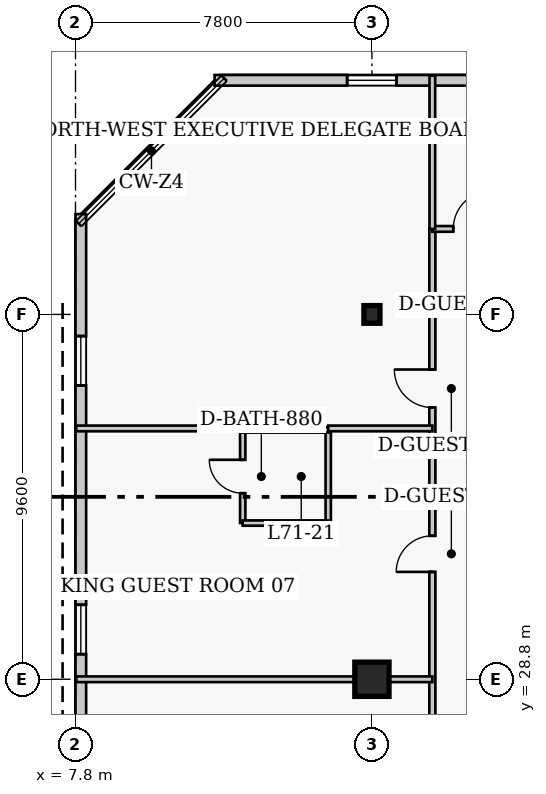
"""IFC4 building model, lengths in metres.
Left out: names, types, materials, properties, quantities, classifications, styles, units other than length and angle.
Written with IfcOpenShell. Run it as: python <this file> out.ifc"""

import sys

from ifc_helpers import new_model, si_unit, direction, frame, frame_2d, origin, origin_2d, place, context, subcontext, project, spatial, rectangle, i_section, extrude, element, fill, save


model = new_model("IFC4")
c1 = context("Model", 3, precision=1e-05, world=origin(), true_north=direction((0.0, 1.0)))
c2 = subcontext(c1, "Body", "Model", "MODEL_VIEW")
j1 = project(units=[si_unit("LENGTHUNIT", "METRE"), si_unit("PLANEANGLEUNIT", "RADIAN")], contexts=[c1])
p1 = place(None, origin())
s1 = spatial("IfcSite", under=j1, at=p1, CompositionType="ELEMENT")
p2 = place(p1, origin())
s2 = spatial("IfcBuilding", under=s1, at=p2, CompositionType="ELEMENT")
p3 = place(p2, frame((0.0, 0.0, 285.4)))
s3 = spatial("IfcBuildingStorey", under=s2, at=p3, CompositionType="ELEMENT", Elevation=285.4)
p4 = place(p3, frame((15.6, 28.8, 0.0), z_axis=(0.0, 0.0, 1.0), x_axis=(1.0, 0.0, 0.0)))
e1 = element("IfcColumn", 1, at=p4, inside=s3, PredefinedType="COLUMN", context=c2, shape_type="SweptSolid", body=[
    extrude(rectangle(XDim=0.9, YDim=0.9, at=origin_2d()), origin(), (0.0, 0.0, 1.0), 4.0),
])
p5 = place(p3, frame((15.6, 38.4, 0.0), z_axis=(0.0, 0.0, 1.0), x_axis=(1.0, 0.0, 0.0)))
e2 = element("IfcColumn", 2, at=p5, inside=s3, PredefinedType="COLUMN", context=c2, shape_type="SweptSolid", body=[
    extrude(i_section(OverallWidth=0.422, OverallDepth=0.465, WebThickness=0.045, FlangeThickness=0.073, FilletRadius=0.017, at=origin_2d()), origin(), (0.0, 0.0, 1.0), 4.0),
])
p6 = place(p3, frame((36.29, 44.56, 0.0), z_axis=(0.0, 0.0, 1.0), x_axis=(-1.0, 0.0, 0.0)))
e3 = element("IfcWall", 3, at=p6, inside=s3, PredefinedType="SOLIDWALL", context=c2, shape_type="SweptSolid", body=[
    extrude(rectangle(XDim=24.83, YDim=0.28, at=frame_2d((12.415, 0.0))), origin(), (0.0, 0.0, 1.0), 3.76),
])
p7 = place(p6, frame((3.488, 0.0, 0.85)))
e4 = element("IfcOpeningElement", 4, at=p7, cuts=e3, PredefinedType="OPENING", context=c2, shape_type="SweptSolid", body=[
    extrude(rectangle(XDim=1.3, YDim=1.7, at=frame_2d((0.65, 0.85))), frame((0.0, 0.15, 0.0), z_axis=(0.0, -1.0, 0.0), x_axis=(1.0, 0.0, 0.0)), (0.0, 0.0, 1.0), 0.3),
])
p8 = place(p6, frame((11.765, 0.0, 0.85)))
e5 = element("IfcOpeningElement", 5, at=p8, cuts=e3, PredefinedType="OPENING", context=c2, shape_type="SweptSolid", body=[
    extrude(rectangle(XDim=1.3, YDim=1.7, at=frame_2d((0.65, 0.85))), frame((0.0, 0.15, 0.0), z_axis=(0.0, -1.0, 0.0), x_axis=(1.0, 0.0, 0.0)), (0.0, 0.0, 1.0), 0.3),
])
p9 = place(p6, frame((20.042, 0.0, 0.85)))
e6 = element("IfcOpeningElement", 6, at=p9, cuts=e3, PredefinedType="OPENING", context=c2, shape_type="SweptSolid", body=[
    extrude(rectangle(XDim=1.3, YDim=1.7, at=frame_2d((0.65, 0.85))), frame((0.0, 0.15, 0.0), z_axis=(0.0, -1.0, 0.0), x_axis=(1.0, 0.0, 0.0)), (0.0, 0.0, 1.0), 0.3),
])
p10 = place(p3, frame((7.94, 41.04, 0.0), z_axis=(0.0, 0.0, 1.0), x_axis=(0.0, -1.0, 0.0)))
e7 = element("IfcWall", 7, at=p10, inside=s3, PredefinedType="SOLIDWALL", context=c2, shape_type="SweptSolid", body=[
    extrude(rectangle(XDim=30.88, YDim=0.28, at=frame_2d((15.44, 0.0))), origin(), (0.0, 0.0, 1.0), 3.76),
])
p11 = place(p10, frame((3.21, 0.0, 0.85)))
e8 = element("IfcOpeningElement", 8, at=p11, cuts=e7, PredefinedType="OPENING", context=c2, shape_type="SweptSolid", body=[
    extrude(rectangle(XDim=1.3, YDim=1.7, at=frame_2d((0.65, 0.85))), frame((0.0, 0.15, 0.0), z_axis=(0.0, -1.0, 0.0), x_axis=(1.0, 0.0, 0.0)), (0.0, 0.0, 1.0), 0.3),
])
p12 = place(p10, frame((10.28, 0.0, 0.85)))
e9 = element("IfcOpeningElement", 9, at=p12, cuts=e7, PredefinedType="OPENING", context=c2, shape_type="SweptSolid", body=[
    extrude(rectangle(XDim=1.3, YDim=1.7, at=frame_2d((0.65, 0.85))), frame((0.0, 0.15, 0.0), z_axis=(0.0, -1.0, 0.0), x_axis=(1.0, 0.0, 0.0)), (0.0, 0.0, 1.0), 0.3),
])
p13 = place(p10, frame((18.65, 0.0, 0.85)))
e10 = element("IfcOpeningElement", 10, at=p13, cuts=e7, PredefinedType="OPENING", context=c2, shape_type="SweptSolid", body=[
    extrude(rectangle(XDim=1.3, YDim=1.7, at=frame_2d((0.65, 0.85))), frame((0.0, 0.15, 0.0), z_axis=(0.0, -1.0, 0.0), x_axis=(1.0, 0.0, 0.0)), (0.0, 0.0, 1.0), 0.3),
])
p14 = place(p10, frame((26.37, 0.0, 0.85)))
e11 = element("IfcOpeningElement", 11, at=p14, cuts=e7, PredefinedType="OPENING", context=c2, shape_type="SweptSolid", body=[
    extrude(rectangle(XDim=1.3, YDim=1.7, at=frame_2d((0.65, 0.85))), frame((0.0, 0.15, 0.0), z_axis=(0.0, -1.0, 0.0), x_axis=(1.0, 0.0, 0.0)), (0.0, 0.0, 1.0), 0.3),
])
p15 = place(p3, frame((17.19, 8.55, 0.0), z_axis=(0.0, 0.0, 1.0), x_axis=(0.0, 1.0, 0.0)))
e12 = element("IfcWall", 12, at=p15, inside=s3, PredefinedType="PARTITIONING", context=c2, shape_type="SweptSolid", body=[
    extrude(rectangle(XDim=32.1, YDim=0.16, at=frame_2d((16.05, 0.0))), origin(), (0.0, 0.0, 1.0), 3.76),
])
p16 = place(p15, frame((5.25, 0.0, 0.0)))
e13 = element("IfcOpeningElement", 13, at=p16, cuts=e12, PredefinedType="OPENING", context=c2, shape_type="SweptSolid", body=[
    extrude(rectangle(XDim=0.95, YDim=2.1, at=frame_2d((0.475, 1.05))), frame((0.0, 0.09, 0.0), z_axis=(0.0, -1.0, 0.0), x_axis=(1.0, 0.0, 0.0)), (0.0, 0.0, 1.0), 0.18),
])
p17 = place(p15, frame((15.375, 0.0, 0.0)))
e14 = element("IfcOpeningElement", 14, at=p17, cuts=e12, PredefinedType="OPENING", context=c2, shape_type="SweptSolid", body=[
    extrude(rectangle(XDim=0.95, YDim=2.1, at=frame_2d((0.475, 1.05))), frame((0.0, 0.09, 0.0), z_axis=(0.0, -1.0, 0.0), x_axis=(1.0, 0.0, 0.0)), (0.0, 0.0, 1.0), 0.18),
])
p18 = place(p15, frame((23.075, 0.0, 0.0)))
e15 = element("IfcOpeningElement", 15, at=p18, cuts=e12, PredefinedType="OPENING", context=c2, shape_type="SweptSolid", body=[
    extrude(rectangle(XDim=0.95, YDim=2.1, at=frame_2d((0.475, 1.05))), frame((0.0, 0.09, 0.0), z_axis=(0.0, -1.0, 0.0), x_axis=(1.0, 0.0, 0.0)), (0.0, 0.0, 1.0), 0.18),
])
p19 = place(p15, frame((27.4, 0.0, 0.0)))
e16 = element("IfcOpeningElement", 16, at=p19, cuts=e12, PredefinedType="OPENING", context=c2, shape_type="SweptSolid", body=[
    extrude(rectangle(XDim=1.0, YDim=2.15, at=frame_2d((0.5, 1.075))), frame((0.0, 0.09, 0.0), z_axis=(0.0, -1.0, 0.0), x_axis=(1.0, 0.0, 0.0)), (0.0, 0.0, 1.0), 0.18),
])
p20 = place(p3, frame((17.19, 40.65, 0.0), z_axis=(0.0, 0.0, 1.0), x_axis=(1.0, 0.0, 0.0)))
e17 = element("IfcWall", 17, at=p20, inside=s3, PredefinedType="PARTITIONING", context=c2, shape_type="SweptSolid", body=[
    extrude(rectangle(XDim=4.91, YDim=0.15, at=frame_2d((2.455, 0.0))), origin(), (0.0, 0.0, 1.0), 3.76),
])
p21 = place(p20, frame((0.55, 0.0, 0.0)))
e18 = element("IfcOpeningElement", 18, at=p21, cuts=e17, PredefinedType="OPENING", context=c2, shape_type="SweptSolid", body=[
    extrude(rectangle(XDim=1.0, YDim=2.15, at=frame_2d((0.5, 1.075))), frame((0.0, 0.085, 0.0), z_axis=(0.0, -1.0, 0.0), x_axis=(1.0, 0.0, 0.0)), (0.0, 0.0, 1.0), 0.17),
])
p22 = place(p3, frame((17.19, 40.65, 0.0), z_axis=(0.0, 0.0, 1.0), x_axis=(0.0, 1.0, 0.0)))
e19 = element("IfcWall", 19, at=p22, inside=s3, PredefinedType="PARTITIONING", context=c2, shape_type="SweptSolid", body=[
    extrude(rectangle(XDim=4.03, YDim=0.15, at=frame_2d((2.015, 0.0))), origin(), (0.0, 0.0, 1.0), 3.76),
])
p23 = place(p3, frame((7.82, 28.8, 0.0), z_axis=(0.0, 0.0, 1.0), x_axis=(1.0, 0.0, 0.0)))
e20 = element("IfcWall", 20, at=p23, inside=s3, PredefinedType="PARTITIONING", context=c2, shape_type="SweptSolid", body=[
    extrude(rectangle(XDim=9.37, YDim=0.15, at=frame_2d((4.685, 0.0))), origin(), (0.0, 0.0, 1.0), 3.064),
])
p24 = place(p3, frame((12.2, 32.91, 0.0), z_axis=(0.0, 0.0, 1.0), x_axis=(0.0, 1.0, 0.0)))
e21 = element("IfcWall", 21, at=p24, inside=s3, PredefinedType="PLUMBINGWALL", context=c2, shape_type="SweptSolid", body=[
    extrude(rectangle(XDim=2.45, YDim=0.14, at=frame_2d((1.225, 0.0))), origin(), (0.0, 0.0, 1.0), 3.76),
])
p25 = place(p24, frame((0.785, 0.0, 0.0)))
e22 = element("IfcOpeningElement", 22, at=p25, cuts=e21, PredefinedType="OPENING", context=c2, shape_type="SweptSolid", body=[
    extrude(rectangle(XDim=0.88, YDim=2.05, at=frame_2d((0.44, 1.025))), frame((0.0, 0.08, 0.0), z_axis=(0.0, -1.0, 0.0), x_axis=(1.0, 0.0, 0.0)), (0.0, 0.0, 1.0), 0.16),
])
p26 = place(p3, frame((14.45, 32.91, 0.0), z_axis=(0.0, 0.0, 1.0), x_axis=(0.0, 1.0, 0.0)))
e23 = element("IfcWall", 23, at=p26, inside=s3, PredefinedType="PLUMBINGWALL", context=c2, shape_type="SweptSolid", body=[
    extrude(rectangle(XDim=2.45, YDim=0.14, at=frame_2d((1.225, 0.0))), origin(), (0.0, 0.0, 1.0), 3.76),
])
for number, where, z_axis, x_axis in (
    (24, (12.2, 32.91, 0.0), (0.0, 0.0, 1.0), (1.0, 0.0, 0.0)),
    (25, (12.2, 35.36, 0.0), (0.0, 0.0, 1.0), (1.0, 0.0, 0.0)),
):
    element("IfcWall", number, at=place(p3, frame(where, z_axis=z_axis, x_axis=x_axis)), inside=s3, PredefinedType="PLUMBINGWALL", context=c2, shape_type="SweptSolid", body=[
        extrude(rectangle(XDim=2.25, YDim=0.14, at=frame_2d((1.125, 0.0))), origin(), (0.0, 0.0, 1.0), 3.76),
    ])
p27 = place(p3, frame((7.82, 35.4, 0.0), z_axis=(0.0, 0.0, 1.0), x_axis=(1.0, 0.0, 0.0)))
e26 = element("IfcWall", 26, at=p27, inside=s3, PredefinedType="PARTITIONING", context=c2, shape_type="SweptSolid", body=[
    extrude(rectangle(XDim=4.38, YDim=0.15, at=frame_2d((2.19, 0.0))), origin(), (0.0, 0.0, 1.0), 3.76),
])
p28 = place(p3, frame((14.45, 35.4, 0.0), z_axis=(0.0, 0.0, 1.0), x_axis=(1.0, 0.0, 0.0)))
e27 = element("IfcWall", 27, at=p28, inside=s3, PredefinedType="PARTITIONING", context=c2, shape_type="SweptSolid", body=[
    extrude(rectangle(XDim=2.74, YDim=0.15, at=frame_2d((1.37, 0.0))), origin(), (0.0, 0.0, 1.0), 3.76),
])
p29 = place(p9, origin())
e28 = element("IfcWindow", 28, at=p29, inside=s3, PartitioningType="SINGLE_PANEL", PredefinedType="WINDOW", context=c2, shape_type="SweptSolid", body=[
    extrude(rectangle(XDim=1.3, YDim=1.7, at=frame_2d((0.65, 0.85))), frame((0.0, 0.03, 0.0), z_axis=(0.0, -1.0, 0.0), x_axis=(1.0, 0.0, 0.0)), (0.0, 0.0, 1.0), 0.06),
])
fill(e6, e28)
p30 = place(p11, origin())
e29 = element("IfcWindow", 29, at=p30, inside=s3, PartitioningType="SINGLE_PANEL", PredefinedType="WINDOW", context=c2, shape_type="SweptSolid", body=[
    extrude(rectangle(XDim=1.3, YDim=1.7, at=frame_2d((0.65, 0.85))), frame((0.0, 0.03, 0.0), z_axis=(0.0, -1.0, 0.0), x_axis=(1.0, 0.0, 0.0)), (0.0, 0.0, 1.0), 0.06),
])
fill(e8, e29)
p31 = place(p12, origin())
e30 = element("IfcWindow", 30, at=p31, inside=s3, PartitioningType="SINGLE_PANEL", PredefinedType="WINDOW", context=c2, shape_type="SweptSolid", body=[
    extrude(rectangle(XDim=1.3, YDim=1.7, at=frame_2d((0.65, 0.85))), frame((0.0, 0.03, 0.0), z_axis=(0.0, -1.0, 0.0), x_axis=(1.0, 0.0, 0.0)), (0.0, 0.0, 1.0), 0.06),
])
fill(e9, e30)
p32 = place(p21, origin())
e31 = element("IfcDoor", 31, at=p32, inside=s3, OperationType="SINGLE_SWING_RIGHT", PredefinedType="DOOR", context=c2, shape_type="SweptSolid", body=[
    extrude(rectangle(XDim=1.0, YDim=2.15, at=frame_2d((0.5, 1.075))), frame((0.0, 0.025, 0.0), z_axis=(0.0, -1.0, 0.0), x_axis=(1.0, 0.0, 0.0)), (0.0, 0.0, 1.0), 0.05),
])
fill(e18, e31)
p33 = place(p25, origin())
e32 = element("IfcDoor", 32, at=p33, inside=s3, OperationType="SINGLE_SWING_RIGHT", PredefinedType="DOOR", context=c2, shape_type="SweptSolid", body=[
    extrude(rectangle(XDim=0.88, YDim=2.05, at=frame_2d((0.44, 1.025))), frame((0.0, 0.025, 0.0), z_axis=(0.0, -1.0, 0.0), x_axis=(1.0, 0.0, 0.0)), (0.0, 0.0, 1.0), 0.05),
])
fill(e22, e32)
p34 = place(p18, origin())
e33 = element("IfcDoor", 33, at=p34, inside=s3, OperationType="SINGLE_SWING_LEFT", PredefinedType="DOOR", context=c2, shape_type="SweptSolid", body=[
    extrude(rectangle(XDim=0.95, YDim=2.1, at=frame_2d((0.475, 1.05))), frame((0.0, 0.025, 0.0), z_axis=(0.0, -1.0, 0.0), x_axis=(1.0, 0.0, 0.0)), (0.0, 0.0, 1.0), 0.05),
])
fill(e15, e33)
p35 = place(p19, origin())
e34 = element("IfcDoor", 34, at=p35, inside=s3, OperationType="SINGLE_SWING_RIGHT", PredefinedType="DOOR", context=c2, shape_type="SweptSolid", body=[
    extrude(rectangle(XDim=1.0, YDim=2.15, at=frame_2d((0.5, 1.075))), frame((0.0, 0.025, 0.0), z_axis=(0.0, -1.0, 0.0), x_axis=(1.0, 0.0, 0.0)), (0.0, 0.0, 1.0), 0.05),
])
fill(e16, e34)
save(model, sys.argv[1])
